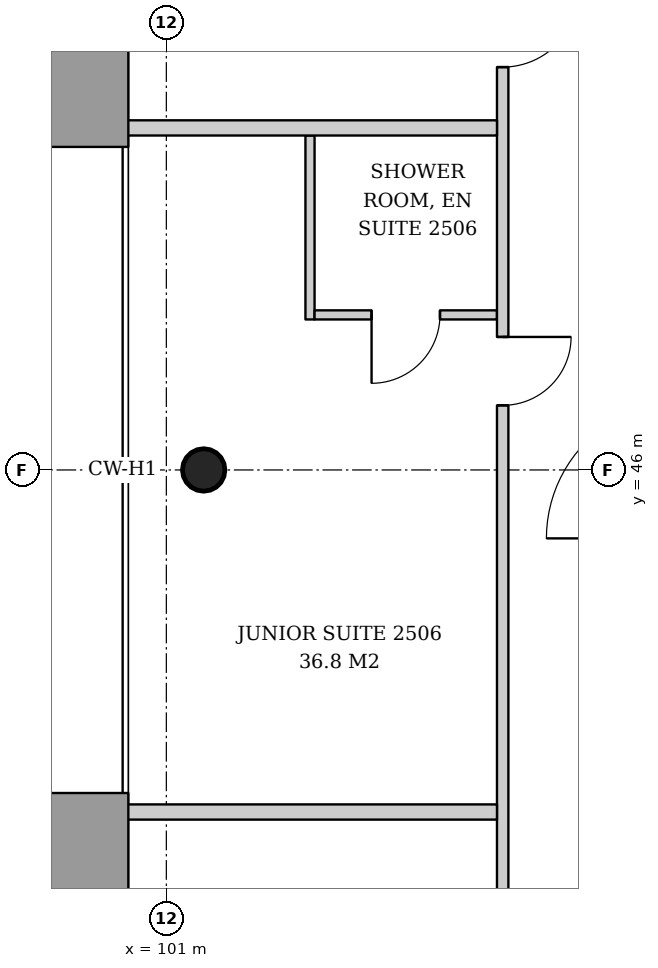
"""IFC4 building model, lengths in metres.
Left out: names, types, materials, properties, quantities, classifications, styles, units other than length and angle.
Written with IfcOpenShell. Run it as: python <this file> out.ifc"""

import sys

from ifc_helpers import new_model, si_unit, direction, frame, frame_2d, origin, origin_2d, place, context, subcontext, project, spatial, rectangle, hollow_circle, extrude, element, fill, save


model = new_model("IFC4")
c1 = context("Model", 3, precision=1e-05, world=origin(), true_north=direction((0.0, 1.0)))
c2 = subcontext(c1, "Body", "Model", "MODEL_VIEW")
j1 = project(units=[si_unit("LENGTHUNIT", "METRE"), si_unit("PLANEANGLEUNIT", "RADIAN")], contexts=[c1])
p1 = place(None, origin())
s1 = spatial("IfcSite", under=j1, at=p1, CompositionType="ELEMENT")
p2 = place(p1, origin())
s2 = spatial("IfcBuilding", under=s1, at=p2, CompositionType="ELEMENT")
p3 = place(p2, frame((0.0, 0.0, 100.8)))
s3 = spatial("IfcBuildingStorey", under=s2, at=p3, CompositionType="ELEMENT", Elevation=100.8)
p4 = place(p3, frame((101.44, 46.0, 0.0), z_axis=(0.043069538298, 0.0, 0.999072076915), x_axis=(0.0, 1.0, 0.0)))
e1 = element("IfcColumn", 1, at=p4, inside=s3, PredefinedType="COLUMN", context=c2, shape_type="SweptSolid", body=[
    extrude(hollow_circle(Radius=0.28, WallThickness=0.02, at=origin_2d()), origin(), (0.0, 0.0, 1.0), 3.803),
])
p5 = place(p3, frame((102.89, 50.4, 0.0), z_axis=(0.0, 0.0, 1.0), x_axis=(0.0, -1.0, 0.0)))
e2 = element("IfcWall", 2, at=p5, inside=s3, PredefinedType="PARTITIONING", context=c2, shape_type="SweptSolid", body=[
    extrude(rectangle(XDim=2.42, YDim=0.12, at=frame_2d((1.21, 0.0))), origin(), (0.0, 0.0, 1.0), 3.6),
])
p6 = place(p3, frame((105.35, 48.04, 0.0), z_axis=(0.0, 0.0, 1.0), x_axis=(-1.0, 0.0, 0.0)))
e3 = element("IfcWall", 3, at=p6, inside=s3, PredefinedType="PARTITIONING", context=c2, shape_type="SweptSolid", body=[
    extrude(rectangle(XDim=2.4, YDim=0.12, at=frame_2d((1.2, 0.0))), origin(), (0.0, 0.0, 1.0), 3.6),
])
p7 = place(p6, frame((0.75, 0.0, 0.0)))
e4 = element("IfcOpeningElement", 4, at=p7, cuts=e3, PredefinedType="OPENING", context=c2, shape_type="SweptSolid", body=[
    extrude(rectangle(XDim=0.9, YDim=2.1, at=frame_2d((0.45, 1.05))), frame((0.0, 0.07, 0.0), z_axis=(0.0, -1.0, 0.0), x_axis=(1.0, 0.0, 0.0)), (0.0, 0.0, 1.0), 0.14),
])
p8 = place(p3, frame((105.425, 57.436, 0.0), z_axis=(0.0, 0.0, 1.0), x_axis=(0.0, -1.0, 0.0)))
e5 = element("IfcWall", 5, at=p8, inside=s3, PredefinedType="PARTITIONING", context=c2, shape_type="SweptSolid", body=[
    extrude(rectangle(XDim=22.872, YDim=0.15, at=frame_2d((11.436, 0.0))), origin(), (0.0, 0.0, 1.0), 2.9),
])
p9 = place(p8, frame((0.686, 0.0, 0.0)))
e6 = element("IfcOpeningElement", 6, at=p9, cuts=e5, PredefinedType="OPENING", context=c2, shape_type="SweptSolid", body=[
    extrude(rectangle(XDim=0.9, YDim=2.1, at=frame_2d((0.45, 1.05))), frame((0.0, 0.085, 0.0), z_axis=(0.0, -1.0, 0.0), x_axis=(1.0, 0.0, 0.0)), (0.0, 0.0, 1.0), 0.17),
])
p10 = place(p8, frame((5.136, 0.0, 0.0)))
e7 = element("IfcOpeningElement", 7, at=p10, cuts=e5, PredefinedType="OPENING", context=c2, shape_type="SweptSolid", body=[
    extrude(rectangle(XDim=1.0, YDim=2.1, at=frame_2d((0.5, 1.05))), frame((0.0, 0.085, 0.0), z_axis=(0.0, -1.0, 0.0), x_axis=(1.0, 0.0, 0.0)), (0.0, 0.0, 1.0), 0.17),
])
p11 = place(p8, frame((9.686, 0.0, 0.0)))
e8 = element("IfcOpeningElement", 8, at=p11, cuts=e5, PredefinedType="OPENING", context=c2, shape_type="SweptSolid", body=[
    extrude(rectangle(XDim=0.9, YDim=2.1, at=frame_2d((0.45, 1.05))), frame((0.0, 0.085, 0.0), z_axis=(0.0, -1.0, 0.0), x_axis=(1.0, 0.0, 0.0)), (0.0, 0.0, 1.0), 0.17),
])
p12 = place(p8, frame((18.636, 0.0, 0.0)))
e9 = element("IfcOpeningElement", 9, at=p12, cuts=e5, PredefinedType="OPENING", context=c2, shape_type="SweptSolid", body=[
    extrude(rectangle(XDim=1.0, YDim=2.1, at=frame_2d((0.5, 1.05))), frame((0.0, 0.085, 0.0), z_axis=(0.0, -1.0, 0.0), x_axis=(1.0, 0.0, 0.0)), (0.0, 0.0, 1.0), 0.17),
])
for number, where, z_axis, x_axis in (
    (10, (105.35, 50.5, 0.0), (0.0, 0.0, 1.0), (-1.0, 0.0, 0.0)),
    (11, (105.35, 41.5, 0.0), (0.0, 0.0, 1.0), (-1.0, 0.0, 0.0)),
):
    element("IfcWall", number, at=place(p3, frame(where, z_axis=z_axis, x_axis=x_axis)), inside=s3, PredefinedType="PARTITIONING", context=c2, shape_type="SweptSolid", body=[
        extrude(rectangle(XDim=4.89, YDim=0.2, at=frame_2d((2.445, 0.0))), origin(), (0.0, 0.0, 1.0), 3.2),
    ])
p13 = place(p7, origin())
e12 = element("IfcDoor", 12, at=p13, inside=s3, OperationType="SINGLE_SWING_RIGHT", PredefinedType="DOOR", context=c2, shape_type="SweptSolid", body=[
    extrude(rectangle(XDim=0.9, YDim=2.1, at=frame_2d((0.45, 1.05))), frame((0.0, 0.025, 0.0), z_axis=(0.0, -1.0, 0.0), x_axis=(1.0, 0.0, 0.0)), (0.0, 0.0, 1.0), 0.05),
])
fill(e4, e12)
p14 = place(p10, origin())
e13 = element("IfcDoor", 13, at=p14, inside=s3, OperationType="SINGLE_SWING_LEFT", PredefinedType="DOOR", context=c2, shape_type="SweptSolid", body=[
    extrude(rectangle(XDim=1.0, YDim=2.1, at=frame_2d((0.5, 1.05))), frame((0.0, 0.025, 0.0), z_axis=(0.0, -1.0, 0.0), x_axis=(1.0, 0.0, 0.0)), (0.0, 0.0, 1.0), 0.05),
])
fill(e7, e13)
p15 = place(p11, origin())
e14 = element("IfcDoor", 14, at=p15, inside=s3, OperationType="SINGLE_SWING_LEFT", PredefinedType="DOOR", context=c2, shape_type="SweptSolid", body=[
    extrude(rectangle(XDim=0.9, YDim=2.1, at=frame_2d((0.45, 1.05))), frame((0.0, 0.025, 0.0), z_axis=(0.0, -1.0, 0.0), x_axis=(1.0, 0.0, 0.0)), (0.0, 0.0, 1.0), 0.05),
])
fill(e8, e14)
save(model, sys.argv[1])
